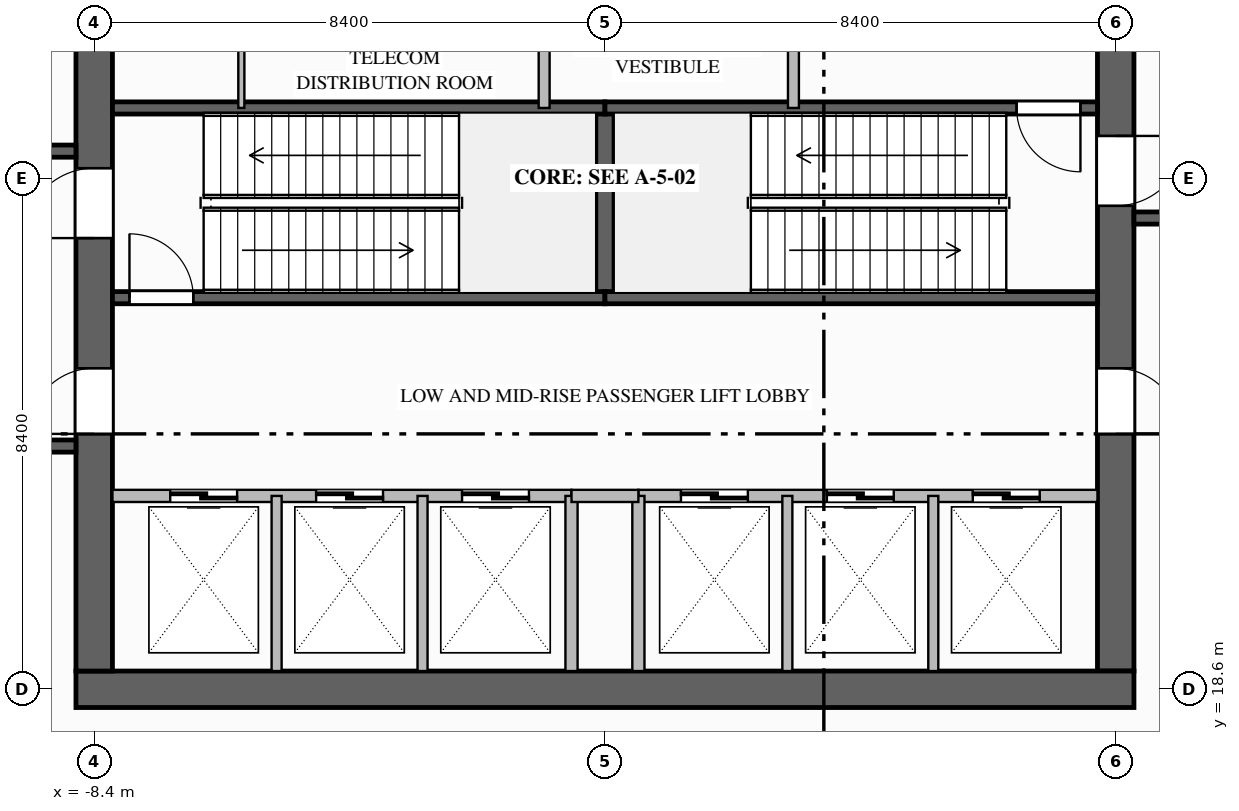
"""IFC4 building model, lengths in metres.
Left out: names, types, materials, properties, quantities, classifications, styles, units other than length and angle.
Written with IfcOpenShell. Run it as: python <this file> out.ifc"""

import sys

from ifc_helpers import new_model, si_unit, direction, frame, frame_2d, origin, place, context, subcontext, project, spatial, rectangle, extrude, element, fill, save


model = new_model("IFC4")
c1 = context("Model", 3, precision=1e-05, world=origin(), true_north=direction((0.0, 1.0)))
c2 = subcontext(c1, "Body", "Model", "MODEL_VIEW")
j1 = project(units=[si_unit("LENGTHUNIT", "METRE"), si_unit("PLANEANGLEUNIT", "RADIAN")], contexts=[c1])
p1 = place(None, origin())
s1 = spatial("IfcSite", under=j1, at=p1, CompositionType="ELEMENT")
p2 = place(p1, origin())
s2 = spatial("IfcBuilding", under=s1, at=p2, CompositionType="ELEMENT")
p3 = place(p2, origin())
s3 = spatial("IfcBuildingStorey", under=s2, at=p3, CompositionType="ELEMENT", Elevation=0.0)
p4 = place(p3, frame((8.4, 35.1, 0.0), z_axis=(0.0, 0.0, 1.0), x_axis=(0.0, -1.0, 0.0)))
e1 = element("IfcWall", 1, at=p4, inside=s3, PredefinedType="SHEAR", context=c2, shape_type="SweptSolid", body=[
    extrude(rectangle(XDim=16.2, YDim=0.6, at=frame_2d((8.1, 0.0))), origin(), (0.0, 0.0, 1.0), 5.6),
])
p5 = place(p4, frame((7.4, 0.0, 0.0)))
e2 = element("IfcOpeningElement", 2, at=p5, cuts=e1, PredefinedType="OPENING", context=c2, shape_type="SweptSolid", body=[
    extrude(rectangle(XDim=1.15, YDim=2.15, at=frame_2d((0.575, 1.075))), frame((0.0, 0.31, 0.0), z_axis=(0.0, -1.0, 0.0), x_axis=(1.0, 0.0, 0.0)), (0.0, 0.0, 1.0), 0.62),
])
p6 = place(p4, frame((3.08, 0.0, 0.0)))
e3 = element("IfcOpeningElement", 3, at=p6, cuts=e1, PredefinedType="OPENING", context=c2, shape_type="SweptSolid", body=[
    extrude(rectangle(XDim=1.12, YDim=2.1, at=frame_2d((0.56, 1.05))), frame((0.0, 0.31, 0.0), z_axis=(0.0, -1.0, 0.0), x_axis=(1.0, 0.0, 0.0)), (0.0, 0.0, 1.0), 0.62),
])
p7 = place(p4, frame((11.22, 0.0, 0.0)))
e4 = element("IfcOpeningElement", 4, at=p7, cuts=e1, PredefinedType="OPENING", context=c2, shape_type="SweptSolid", body=[
    extrude(rectangle(XDim=1.08, YDim=2.04, at=frame_2d((0.54, 1.02))), frame((0.0, 0.31, 0.0), z_axis=(0.0, -1.0, 0.0), x_axis=(1.0, 0.0, 0.0)), (0.0, 0.0, 1.0), 0.62),
])
p8 = place(p3, frame((8.7, 18.6, 0.0), z_axis=(0.0, 0.0, 1.0), x_axis=(-1.0, 0.0, 0.0)))
e5 = element("IfcWall", 5, at=p8, inside=s3, PredefinedType="SHEAR", context=c2, shape_type="SweptSolid", body=[
    extrude(rectangle(XDim=17.4, YDim=0.6, at=frame_2d((8.7, 0.0))), origin(), (0.0, 0.0, 1.0), 5.6),
])
p9 = place(p3, frame((-8.4, 18.9, 0.0), z_axis=(0.0, 0.0, 1.0), x_axis=(0.0, 1.0, 0.0)))
e6 = element("IfcWall", 6, at=p9, inside=s3, PredefinedType="SHEAR", context=c2, shape_type="SweptSolid", body=[
    extrude(rectangle(XDim=16.2, YDim=0.6, at=frame_2d((8.1, 0.0))), origin(), (0.0, 0.0, 1.0), 5.6),
])
p10 = place(p9, frame((7.12, 0.0, 0.0)))
e7 = element("IfcOpeningElement", 7, at=p10, cuts=e6, PredefinedType="OPENING", context=c2, shape_type="SweptSolid", body=[
    extrude(rectangle(XDim=1.15, YDim=2.15, at=frame_2d((0.575, 1.075))), frame((0.0, 0.31, 0.0), z_axis=(0.0, -1.0, 0.0), x_axis=(1.0, 0.0, 0.0)), (0.0, 0.0, 1.0), 0.62),
])
p11 = place(p9, frame((12.02, 0.0, 0.0)))
e8 = element("IfcOpeningElement", 8, at=p11, cuts=e6, PredefinedType="OPENING", context=c2, shape_type="SweptSolid", body=[
    extrude(rectangle(XDim=1.08, YDim=2.04, at=frame_2d((0.54, 1.02))), frame((0.0, 0.31, 0.0), z_axis=(0.0, -1.0, 0.0), x_axis=(1.0, 0.0, 0.0)), (0.0, 0.0, 1.0), 0.62),
])
p12 = place(p9, frame((3.9, 0.0, 0.0)))
e9 = element("IfcOpeningElement", 9, at=p12, cuts=e6, PredefinedType="OPENING", context=c2, shape_type="SweptSolid", body=[
    extrude(rectangle(XDim=1.08, YDim=2.04, at=frame_2d((0.54, 1.02))), frame((0.0, 0.31, 0.0), z_axis=(0.0, -1.0, 0.0), x_axis=(1.0, 0.0, 0.0)), (0.0, 0.0, 1.0), 0.62),
])
p13 = place(p3, frame((0.0, 25.04, 0.0), z_axis=(0.0, 0.0, 1.0), x_axis=(0.0, 1.0, 0.0)))
e10 = element("IfcWall", 10, at=p13, inside=s3, PredefinedType="SOLIDWALL", context=c2, shape_type="SweptSolid", body=[
    extrude(rectangle(XDim=3.12, YDim=0.3, at=frame_2d((1.56, 0.0))), origin(), (0.0, 0.0, 1.0), 5.3),
])
p14 = place(p3, frame((-8.1, 25.04, 0.0), z_axis=(0.0, 0.0, 1.0), x_axis=(1.0, 0.0, 0.0)))
e11 = element("IfcWall", 11, at=p14, inside=s3, PredefinedType="SOLIDWALL", context=c2, shape_type="SweptSolid", body=[
    extrude(rectangle(XDim=8.1, YDim=0.2, at=frame_2d((4.05, 0.0))), origin(), (0.0, 0.0, 1.0), 5.3),
])
p15 = place(p14, frame((0.28, 0.0, 0.0)))
e12 = element("IfcOpeningElement", 12, at=p15, cuts=e11, PredefinedType="OPENING", context=c2, shape_type="SweptSolid", body=[
    extrude(rectangle(XDim=1.05, YDim=2.1, at=frame_2d((0.525, 1.05))), frame((0.0, 0.11, 0.0), z_axis=(0.0, -1.0, 0.0), x_axis=(1.0, 0.0, 0.0)), (0.0, 0.0, 1.0), 0.22),
])
for number, where, z_axis, x_axis in (
    (13, (-8.1, 28.16, 0.0), (0.0, 0.0, 1.0), (1.0, 0.0, 0.0)),
    (14, (0.0, 25.04, 0.0), (0.0, 0.0, 1.0), (1.0, 0.0, 0.0)),
):
    element("IfcWall", number, at=place(p3, frame(where, z_axis=z_axis, x_axis=x_axis)), inside=s3, PredefinedType="SOLIDWALL", context=c2, shape_type="SweptSolid", body=[
        extrude(rectangle(XDim=8.1, YDim=0.2, at=frame_2d((4.05, 0.0))), origin(), (0.0, 0.0, 1.0), 5.3),
    ])
p16 = place(p3, frame((8.1, 28.16, 0.0), z_axis=(0.0, 0.0, 1.0), x_axis=(-1.0, 0.0, 0.0)))
e15 = element("IfcWall", 15, at=p16, inside=s3, PredefinedType="SOLIDWALL", context=c2, shape_type="SweptSolid", body=[
    extrude(rectangle(XDim=8.1, YDim=0.2, at=frame_2d((4.05, 0.0))), origin(), (0.0, 0.0, 1.0), 5.3),
])
p17 = place(p16, frame((0.28, 0.0, 0.0)))
e16 = element("IfcOpeningElement", 16, at=p17, cuts=e15, PredefinedType="OPENING", context=c2, shape_type="SweptSolid", body=[
    extrude(rectangle(XDim=1.05, YDim=2.1, at=frame_2d((0.525, 1.05))), frame((0.0, 0.11, 0.0), z_axis=(0.0, -1.0, 0.0), x_axis=(1.0, 0.0, 0.0)), (0.0, 0.0, 1.0), 0.22),
])
p18 = place(p3, frame((3.1, 28.16, 0.0), z_axis=(0.0, 0.0, 1.0), x_axis=(0.0, 1.0, 0.0)))
e17 = element("IfcWall", 17, at=p18, inside=s3, PredefinedType="SOLIDWALL", context=c2, shape_type="SweptSolid", body=[
    extrude(rectangle(XDim=4.06, YDim=0.18, at=frame_2d((2.03, 0.0))), origin(), (0.0, 0.0, 1.0), 5.3),
])
p19 = place(p18, frame((1.4, 0.0, 0.0)))
e18 = element("IfcOpeningElement", 18, at=p19, cuts=e17, PredefinedType="OPENING", context=c2, shape_type="SweptSolid", body=[
    extrude(rectangle(XDim=1.12, YDim=2.1, at=frame_2d((0.56, 1.05))), frame((0.0, 0.1, 0.0), z_axis=(0.0, -1.0, 0.0), x_axis=(1.0, 0.0, 0.0)), (0.0, 0.0, 1.0), 0.2),
])
p20 = place(p3, frame((-1.0, 28.16, 0.0), z_axis=(0.0, 0.0, 1.0), x_axis=(0.0, 1.0, 0.0)))
e19 = element("IfcWall", 19, at=p20, inside=s3, PredefinedType="SOLIDWALL", context=c2, shape_type="SweptSolid", body=[
    extrude(rectangle(XDim=4.02, YDim=0.18, at=frame_2d((2.01, 0.0))), origin(), (0.0, 0.0, 1.0), 5.3),
])
p21 = place(p20, frame((2.49, 0.0, 0.0)))
e20 = element("IfcOpeningElement", 20, at=p21, cuts=e19, PredefinedType="OPENING", context=c2, shape_type="SweptSolid", body=[
    extrude(rectangle(XDim=1.0, YDim=2.1, at=frame_2d((0.5, 1.05))), frame((0.0, 0.1, 0.0), z_axis=(0.0, -1.0, 0.0), x_axis=(1.0, 0.0, 0.0)), (0.0, 0.0, 1.0), 0.2),
])
p22 = place(p3, frame((-5.98, 28.16, 0.0), z_axis=(0.0, 0.0, 1.0), x_axis=(0.0, 1.0, 0.0)))
e21 = element("IfcWall", 21, at=p22, inside=s3, PredefinedType="PARTITIONING", context=c2, shape_type="SweptSolid", body=[
    extrude(rectangle(XDim=1.98, YDim=0.1, at=frame_2d((0.99, 0.0))), origin(), (0.0, 0.0, 1.0), 5.3),
])
p23 = place(p3, frame((-0.55, 21.78, 0.0), z_axis=(0.0, 0.0, 1.0), x_axis=(-1.0, 0.0, 0.0)))
e22 = element("IfcWall", 22, at=p23, inside=s3, PredefinedType="SOLIDWALL", context=c2, shape_type="SweptSolid", body=[
    extrude(rectangle(XDim=7.55, YDim=0.2, at=frame_2d((3.775, 0.0))), origin(), (0.0, 0.0, 1.0), 5.3),
])
p24 = place(p23, frame((5.5, 0.0, 0.0)))
e23 = element("IfcOpeningElement", 23, at=p24, cuts=e22, PredefinedType="OPENING", context=c2, shape_type="SweptSolid", body=[
    extrude(rectangle(XDim=1.1, YDim=2.2, at=frame_2d((0.55, 1.1))), frame((0.0, 0.11, 0.0), z_axis=(0.0, -1.0, 0.0), x_axis=(1.0, 0.0, 0.0)), (0.0, 0.0, 1.0), 0.22),
])
p25 = place(p23, frame((3.1, 0.0, 0.0)))
e24 = element("IfcOpeningElement", 24, at=p25, cuts=e22, PredefinedType="OPENING", context=c2, shape_type="SweptSolid", body=[
    extrude(rectangle(XDim=1.1, YDim=2.2, at=frame_2d((0.55, 1.1))), frame((0.0, 0.11, 0.0), z_axis=(0.0, -1.0, 0.0), x_axis=(1.0, 0.0, 0.0)), (0.0, 0.0, 1.0), 0.22),
])
p26 = place(p23, frame((0.7, 0.0, 0.0)))
e25 = element("IfcOpeningElement", 25, at=p26, cuts=e22, PredefinedType="OPENING", context=c2, shape_type="SweptSolid", body=[
    extrude(rectangle(XDim=1.1, YDim=2.2, at=frame_2d((0.55, 1.1))), frame((0.0, 0.11, 0.0), z_axis=(0.0, -1.0, 0.0), x_axis=(1.0, 0.0, 0.0)), (0.0, 0.0, 1.0), 0.22),
])
for number, where, z_axis, x_axis in (
    (26, (-5.4, 18.9, 0.0), (0.0, 0.0, 1.0), (0.0, 1.0, 0.0)),
    (27, (-3.0, 18.9, 0.0), (0.0, 0.0, 1.0), (0.0, 1.0, 0.0)),
):
    element("IfcWall", number, at=place(p3, frame(where, z_axis=z_axis, x_axis=x_axis)), inside=s3, PredefinedType="PARTITIONING", context=c2, shape_type="SweptSolid", body=[
        extrude(rectangle(XDim=2.88, YDim=0.165, at=frame_2d((1.44, 0.0))), origin(), (0.0, 0.0, 1.0), 5.3),
    ])
p27 = place(p3, frame((-0.55, 18.9, 0.0), z_axis=(0.0, 0.0, 1.0), x_axis=(0.0, 1.0, 0.0)))
e28 = element("IfcWall", 28, at=p27, inside=s3, PredefinedType="SOLIDWALL", context=c2, shape_type="SweptSolid", body=[
    extrude(rectangle(XDim=2.88, YDim=0.2, at=frame_2d((1.44, 0.0))), origin(), (0.0, 0.0, 1.0), 5.3),
])
p28 = place(p3, frame((8.1, 21.78, 0.0), z_axis=(0.0, 0.0, 1.0), x_axis=(-1.0, 0.0, 0.0)))
e29 = element("IfcWall", 29, at=p28, inside=s3, PredefinedType="SOLIDWALL", context=c2, shape_type="SweptSolid", body=[
    extrude(rectangle(XDim=7.55, YDim=0.2, at=frame_2d((3.775, 0.0))), origin(), (0.0, 0.0, 1.0), 5.3),
])
p29 = place(p28, frame((5.75, 0.0, 0.0)))
e30 = element("IfcOpeningElement", 30, at=p29, cuts=e29, PredefinedType="OPENING", context=c2, shape_type="SweptSolid", body=[
    extrude(rectangle(XDim=1.1, YDim=2.2, at=frame_2d((0.55, 1.1))), frame((0.0, 0.11, 0.0), z_axis=(0.0, -1.0, 0.0), x_axis=(1.0, 0.0, 0.0)), (0.0, 0.0, 1.0), 0.22),
])
p30 = place(p28, frame((3.35, 0.0, 0.0)))
e31 = element("IfcOpeningElement", 31, at=p30, cuts=e29, PredefinedType="OPENING", context=c2, shape_type="SweptSolid", body=[
    extrude(rectangle(XDim=1.1, YDim=2.2, at=frame_2d((0.55, 1.1))), frame((0.0, 0.11, 0.0), z_axis=(0.0, -1.0, 0.0), x_axis=(1.0, 0.0, 0.0)), (0.0, 0.0, 1.0), 0.22),
])
p31 = place(p28, frame((0.95, 0.0, 0.0)))
e32 = element("IfcOpeningElement", 32, at=p31, cuts=e29, PredefinedType="OPENING", context=c2, shape_type="SweptSolid", body=[
    extrude(rectangle(XDim=1.1, YDim=2.2, at=frame_2d((0.55, 1.1))), frame((0.0, 0.11, 0.0), z_axis=(0.0, -1.0, 0.0), x_axis=(1.0, 0.0, 0.0)), (0.0, 0.0, 1.0), 0.22),
])
p32 = place(p3, frame((0.55, 18.9, 0.0), z_axis=(0.0, 0.0, 1.0), x_axis=(0.0, 1.0, 0.0)))
e33 = element("IfcWall", 33, at=p32, inside=s3, PredefinedType="SOLIDWALL", context=c2, shape_type="SweptSolid", body=[
    extrude(rectangle(XDim=2.88, YDim=0.2, at=frame_2d((1.44, 0.0))), origin(), (0.0, 0.0, 1.0), 5.3),
])
for number, where, z_axis, x_axis in (
    (34, (3.0, 18.9, 0.0), (0.0, 0.0, 1.0), (0.0, 1.0, 0.0)),
    (35, (5.4, 18.9, 0.0), (0.0, 0.0, 1.0), (0.0, 1.0, 0.0)),
):
    element("IfcWall", number, at=place(p3, frame(where, z_axis=z_axis, x_axis=x_axis)), inside=s3, PredefinedType="PARTITIONING", context=c2, shape_type="SweptSolid", body=[
        extrude(rectangle(XDim=2.88, YDim=0.165, at=frame_2d((1.44, 0.0))), origin(), (0.0, 0.0, 1.0), 5.3),
    ])
p33 = place(p3, frame((-0.55, 21.78, 0.0), z_axis=(0.0, 0.0, 1.0), x_axis=(1.0, 0.0, 0.0)))
e36 = element("IfcWall", 36, at=p33, inside=s3, PredefinedType="SOLIDWALL", context=c2, shape_type="SweptSolid", body=[
    extrude(rectangle(XDim=1.1, YDim=0.2, at=frame_2d((0.55, 0.0))), origin(), (0.0, 0.0, 1.0), 5.3),
])
p34 = place(p3, frame((-26.76, 22.6, 0.0), z_axis=(0.0, 0.0, 1.0), x_axis=(1.0, 0.0, 0.0)))
e37 = element("IfcWall", 37, at=p34, inside=s3, PredefinedType="SOLIDWALL", context=c2, shape_type="SweptSolid", body=[
    extrude(rectangle(XDim=18.06, YDim=0.2, at=frame_2d((9.03, 0.0))), origin(), (0.0, 0.0, 1.0), 5.3),
])
p35 = place(p3, frame((-26.76, 27.45, 0.0), z_axis=(0.0, 0.0, 1.0), x_axis=(1.0, 0.0, 0.0)))
e38 = element("IfcWall", 38, at=p35, inside=s3, PredefinedType="SOLIDWALL", context=c2, shape_type="SweptSolid", body=[
    extrude(rectangle(XDim=18.06, YDim=0.2, at=frame_2d((9.03, 0.0))), origin(), (0.0, 0.0, 1.0), 5.3),
])
p36 = place(p35, frame((14.5, 0.0, 0.0)))
e39 = element("IfcOpeningElement", 39, at=p36, cuts=e38, PredefinedType="OPENING", context=c2, shape_type="SweptSolid", body=[
    extrude(rectangle(XDim=1.15, YDim=2.15, at=frame_2d((0.575, 1.075))), frame((0.0, 0.11, 0.0), z_axis=(0.0, -1.0, 0.0), x_axis=(1.0, 0.0, 0.0)), (0.0, 0.0, 1.0), 0.22),
])
p37 = place(p3, frame((8.7, 26.35, 0.0), z_axis=(0.0, 0.0, 1.0), x_axis=(1.0, 0.0, 0.0)))
e40 = element("IfcWall", 40, at=p37, inside=s3, PredefinedType="SOLIDWALL", context=c2, shape_type="SweptSolid", body=[
    extrude(rectangle(XDim=30.06, YDim=0.2, at=frame_2d((15.03, 0.0))), origin(), (0.0, 0.0, 1.0), 5.3),
])
p38 = place(p37, frame((4.0, 0.0, 0.0)))
e41 = element("IfcOpeningElement", 41, at=p38, cuts=e40, PredefinedType="OPENING", context=c2, shape_type="SweptSolid", body=[
    extrude(rectangle(XDim=1.15, YDim=2.15, at=frame_2d((0.575, 1.075))), frame((0.0, 0.11, 0.0), z_axis=(0.0, -1.0, 0.0), x_axis=(1.0, 0.0, 0.0)), (0.0, 0.0, 1.0), 0.22),
])
p39 = place(p15, origin())
e42 = element("IfcDoor", 42, at=p39, inside=s3, OperationType="SINGLE_SWING_LEFT", PredefinedType="DOOR", context=c2, shape_type="SweptSolid", body=[
    extrude(rectangle(XDim=1.05, YDim=2.1, at=frame_2d((0.525, 1.05))), frame((0.0, 0.025, 0.0), z_axis=(0.0, -1.0, 0.0), x_axis=(1.0, 0.0, 0.0)), (0.0, 0.0, 1.0), 0.05),
])
fill(e12, e42)
p40 = place(p17, origin())
e43 = element("IfcDoor", 43, at=p40, inside=s3, OperationType="SINGLE_SWING_LEFT", PredefinedType="DOOR", context=c2, shape_type="SweptSolid", body=[
    extrude(rectangle(XDim=1.05, YDim=2.1, at=frame_2d((0.525, 1.05))), frame((0.0, 0.025, 0.0), z_axis=(0.0, -1.0, 0.0), x_axis=(1.0, 0.0, 0.0)), (0.0, 0.0, 1.0), 0.05),
])
fill(e16, e43)
p41 = place(p10, origin())
e44 = element("IfcDoor", 44, at=p41, inside=s3, OperationType="SINGLE_SWING_LEFT", PredefinedType="DOOR", context=c2, shape_type="SweptSolid", body=[
    extrude(rectangle(XDim=1.15, YDim=2.15, at=frame_2d((0.575, 1.075))), frame((0.0, 0.025, 0.0), z_axis=(0.0, -1.0, 0.0), x_axis=(1.0, 0.0, 0.0)), (0.0, 0.0, 1.0), 0.05),
])
fill(e7, e44)
p42 = place(p5, origin())
e45 = element("IfcDoor", 45, at=p42, inside=s3, OperationType="SINGLE_SWING_LEFT", PredefinedType="DOOR", context=c2, shape_type="SweptSolid", body=[
    extrude(rectangle(XDim=1.15, YDim=2.15, at=frame_2d((0.575, 1.075))), frame((0.0, 0.025, 0.0), z_axis=(0.0, -1.0, 0.0), x_axis=(1.0, 0.0, 0.0)), (0.0, 0.0, 1.0), 0.05),
])
fill(e2, e45)
p43 = place(p24, origin())
e46 = element("IfcDoor", 46, at=p43, inside=s3, OperationType="SLIDING_TO_LEFT", PredefinedType="DOOR", context=c2, shape_type="SweptSolid", body=[
    extrude(rectangle(XDim=1.1, YDim=2.2, at=frame_2d((0.55, 1.1))), frame((0.0, 0.025, 0.0), z_axis=(0.0, -1.0, 0.0), x_axis=(1.0, 0.0, 0.0)), (0.0, 0.0, 1.0), 0.05),
])
fill(e23, e46)
p44 = place(p25, origin())
e47 = element("IfcDoor", 47, at=p44, inside=s3, OperationType="SLIDING_TO_LEFT", PredefinedType="DOOR", context=c2, shape_type="SweptSolid", body=[
    extrude(rectangle(XDim=1.1, YDim=2.2, at=frame_2d((0.55, 1.1))), frame((0.0, 0.025, 0.0), z_axis=(0.0, -1.0, 0.0), x_axis=(1.0, 0.0, 0.0)), (0.0, 0.0, 1.0), 0.05),
])
fill(e24, e47)
p45 = place(p26, origin())
e48 = element("IfcDoor", 48, at=p45, inside=s3, OperationType="SLIDING_TO_LEFT", PredefinedType="DOOR", context=c2, shape_type="SweptSolid", body=[
    extrude(rectangle(XDim=1.1, YDim=2.2, at=frame_2d((0.55, 1.1))), frame((0.0, 0.025, 0.0), z_axis=(0.0, -1.0, 0.0), x_axis=(1.0, 0.0, 0.0)), (0.0, 0.0, 1.0), 0.05),
])
fill(e25, e48)
p46 = place(p29, origin())
e49 = element("IfcDoor", 49, at=p46, inside=s3, OperationType="SLIDING_TO_LEFT", PredefinedType="DOOR", context=c2, shape_type="SweptSolid", body=[
    extrude(rectangle(XDim=1.1, YDim=2.2, at=frame_2d((0.55, 1.1))), frame((0.0, 0.025, 0.0), z_axis=(0.0, -1.0, 0.0), x_axis=(1.0, 0.0, 0.0)), (0.0, 0.0, 1.0), 0.05),
])
fill(e30, e49)
p47 = place(p30, origin())
e50 = element("IfcDoor", 50, at=p47, inside=s3, OperationType="SLIDING_TO_LEFT", PredefinedType="DOOR", context=c2, shape_type="SweptSolid", body=[
    extrude(rectangle(XDim=1.1, YDim=2.2, at=frame_2d((0.55, 1.1))), frame((0.0, 0.025, 0.0), z_axis=(0.0, -1.0, 0.0), x_axis=(1.0, 0.0, 0.0)), (0.0, 0.0, 1.0), 0.05),
])
fill(e31, e50)
p48 = place(p31, origin())
e51 = element("IfcDoor", 51, at=p48, inside=s3, OperationType="SLIDING_TO_LEFT", PredefinedType="DOOR", context=c2, shape_type="SweptSolid", body=[
    extrude(rectangle(XDim=1.1, YDim=2.2, at=frame_2d((0.55, 1.1))), frame((0.0, 0.025, 0.0), z_axis=(0.0, -1.0, 0.0), x_axis=(1.0, 0.0, 0.0)), (0.0, 0.0, 1.0), 0.05),
])
fill(e32, e51)
p49 = place(p12, origin())
e52 = element("IfcDoor", 52, at=p49, inside=s3, OperationType="SINGLE_SWING_LEFT", PredefinedType="DOOR", context=c2, shape_type="SweptSolid", body=[
    extrude(rectangle(XDim=1.08, YDim=2.04, at=frame_2d((0.54, 1.02))), frame((0.0, 0.025, 0.0), z_axis=(0.0, -1.0, 0.0), x_axis=(1.0, 0.0, 0.0)), (0.0, 0.0, 1.0), 0.05),
])
fill(e9, e52)
p50 = place(p7, origin())
e53 = element("IfcDoor", 53, at=p50, inside=s3, OperationType="SINGLE_SWING_RIGHT", PredefinedType="DOOR", context=c2, shape_type="SweptSolid", body=[
    extrude(rectangle(XDim=1.08, YDim=2.04, at=frame_2d((0.54, 1.02))), frame((0.0, 0.025, 0.0), z_axis=(0.0, -1.0, 0.0), x_axis=(1.0, 0.0, 0.0)), (0.0, 0.0, 1.0), 0.05),
])
fill(e4, e53)
save(model, sys.argv[1])
